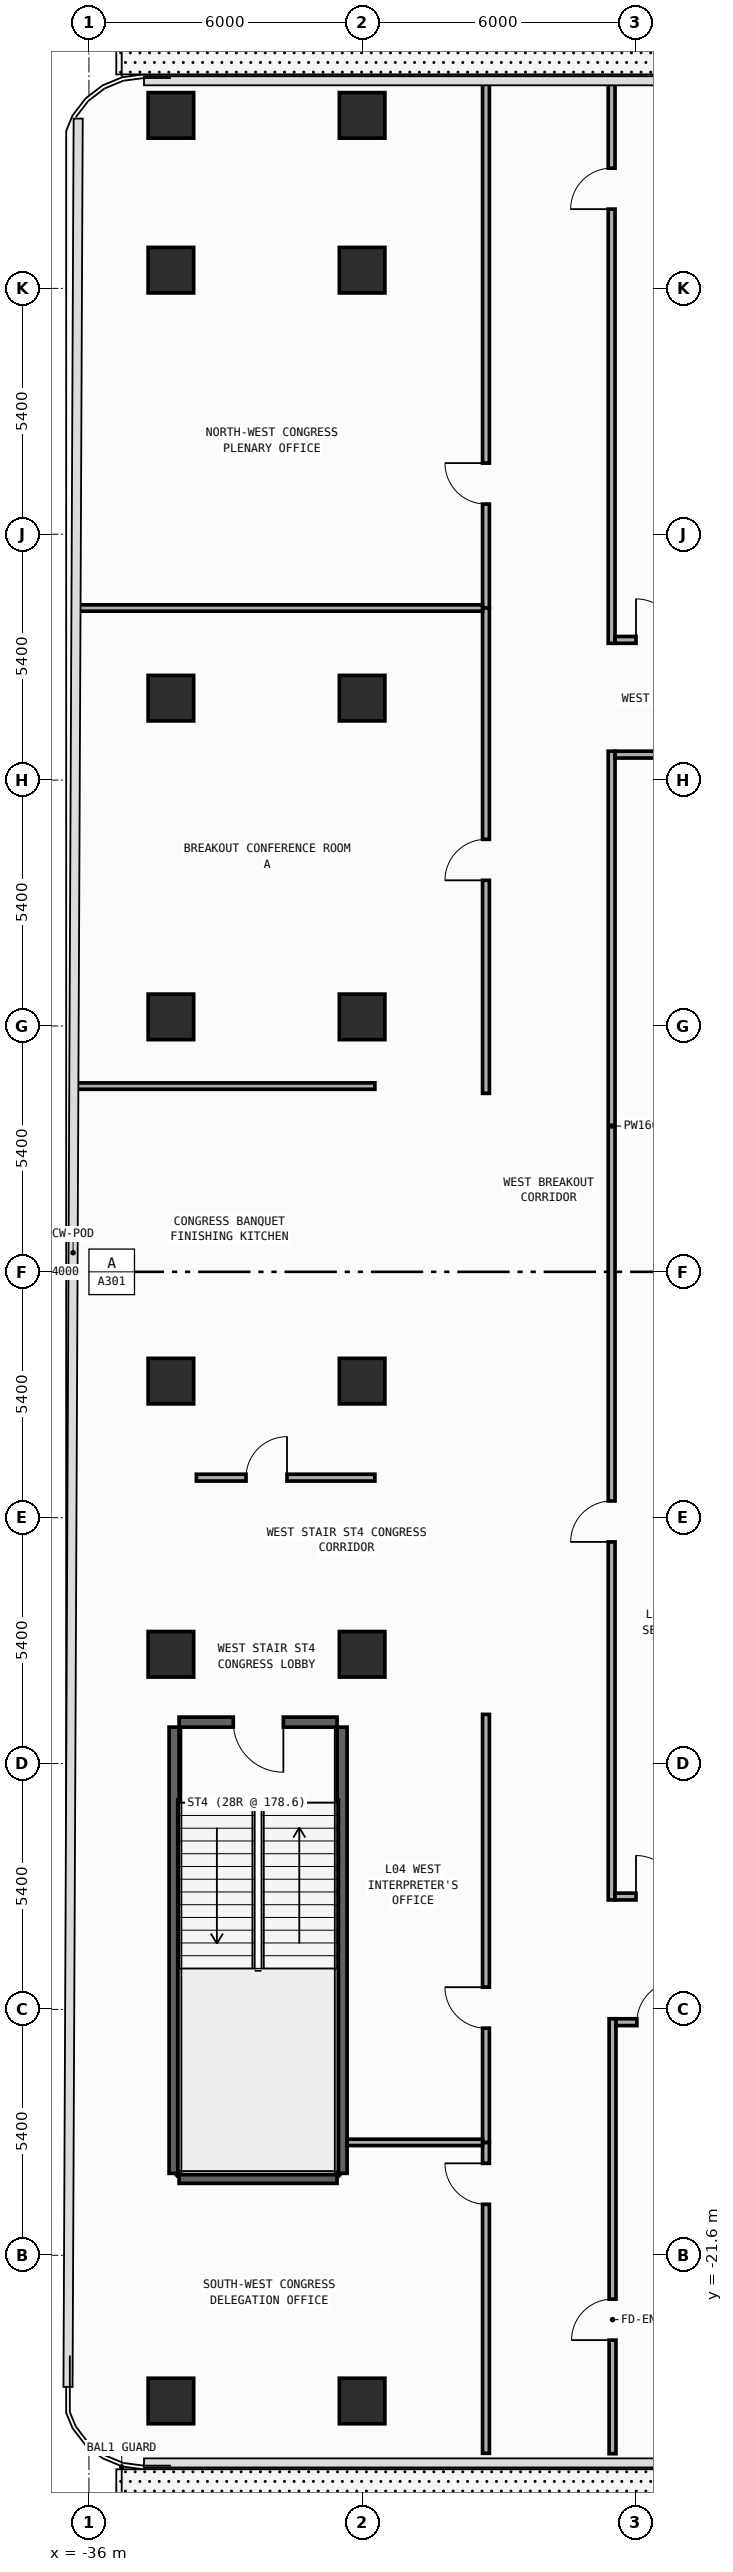
"""IFC4 building model, lengths in metres.
Left out: names, types, materials, properties, quantities, classifications, styles, units other than length and angle.
Written with IfcOpenShell. Run it as: python <this file> out.ifc"""

import sys

from ifc_helpers import new_model, si_unit, direction, frame, frame_2d, origin, origin_2d, place, context, subcontext, project, spatial, rectangle, extrude, element, fill, save


model = new_model("IFC4")
c1 = context("Model", 3, precision=1e-05, world=origin(), true_north=direction((0.0, 1.0)))
c2 = subcontext(c1, "Body", "Model", "MODEL_VIEW")
j1 = project(units=[si_unit("LENGTHUNIT", "METRE"), si_unit("PLANEANGLEUNIT", "RADIAN")], contexts=[c1])
p1 = place(None, origin())
s1 = spatial("IfcSite", under=j1, at=p1, CompositionType="ELEMENT")
p2 = place(p1, origin())
s2 = spatial("IfcBuilding", under=s1, at=p2, CompositionType="ELEMENT")
p3 = place(p2, frame((0.0, 0.0, 16.0)))
s3 = spatial("IfcBuildingStorey", under=s2, at=p3, CompositionType="ELEMENT", Elevation=16.0)
p4 = place(p3, frame((-30.55, -9.89, 0.0), z_axis=(0.0, 0.0, 1.0), x_axis=(-1.0, 0.0, 0.0)))
e1 = element("IfcWall", 1, at=p4, inside=s3, PredefinedType="SHEAR", context=c2, shape_type="SweptSolid", body=[
    extrude(rectangle(XDim=3.47, YDim=0.22, at=frame_2d((1.735, 0.0))), origin(), (0.0, 0.0, 1.0), 4.55),
])
p5 = place(p4, frame((1.18, 0.0, 0.0)))
e2 = element("IfcOpeningElement", 2, at=p5, cuts=e1, PredefinedType="OPENING", context=c2, shape_type="SweptSolid", body=[
    extrude(rectangle(XDim=1.1, YDim=2.2, at=frame_2d((0.55, 1.1))), frame((0.0, 0.12, 0.0), z_axis=(0.0, -1.0, 0.0), x_axis=(1.0, 0.0, 0.0)), (0.0, 0.0, 1.0), 0.24),
])
p6 = place(p3, frame((-34.02, -19.91, 0.0), z_axis=(0.0, 0.0, 1.0), x_axis=(1.0, 0.0, 0.0)))
e3 = element("IfcWall", 3, at=p6, inside=s3, PredefinedType="SHEAR", context=c2, shape_type="SweptSolid", body=[
    extrude(rectangle(XDim=3.47, YDim=0.22, at=frame_2d((1.735, 0.0))), origin(), (0.0, 0.0, 1.0), 4.55),
])
for number, where, z_axis, x_axis in (
    (4, (-34.13, -19.8, 0.0), (0.0, 0.0, 1.0), (0.0, 1.0, 0.0)),
    (5, (-30.44, -19.8, 0.0), (0.0, 0.0, 1.0), (0.0, 1.0, 0.0)),
):
    element("IfcWall", number, at=place(p3, frame(where, z_axis=z_axis, x_axis=x_axis)), inside=s3, PredefinedType="SHEAR", context=c2, shape_type="SweptSolid", body=[
        extrude(rectangle(XDim=9.8, YDim=0.22, at=frame_2d((4.9, 0.0))), origin(), (0.0, 0.0, 1.0), 4.55),
    ])
for number, where, z_axis, x_axis in (
    (6, (-34.2, -24.8, 0.0), (0.0, 0.0, 1.0), (1.0, 0.0, 0.0)),
    (7, (-34.2, -8.4, 0.0), (0.0, 0.0, 1.0), (1.0, 0.0, 0.0)),
    (8, (-34.2, -2.4, 0.0), (0.0, 0.0, 1.0), (1.0, 0.0, 0.0)),
    (9, (-34.2, 5.6, 0.0), (0.0, 0.0, 1.0), (1.0, 0.0, 0.0)),
    (10, (-34.2, 12.6, 0.0), (0.0, 0.0, 1.0), (1.0, 0.0, 0.0)),
    (11, (-34.2, 22.0, 0.0), (0.0, 0.0, 1.0), (1.0, 0.0, 0.0)),
    (12, (-34.2, 25.4, 0.0), (0.0, 0.0, 1.0), (1.0, 0.0, 0.0)),
    (13, (-30.0, -24.8, 0.0), (0.0, 0.0, 1.0), (1.0, 0.0, 0.0)),
    (14, (-30.0, -8.4, 0.0), (0.0, 0.0, 1.0), (1.0, 0.0, 0.0)),
    (15, (-30.0, -2.4, 0.0), (0.0, 0.0, 1.0), (1.0, 0.0, 0.0)),
    (16, (-30.0, 5.6, 0.0), (0.0, 0.0, 1.0), (1.0, 0.0, 0.0)),
    (17, (-30.0, 12.6, 0.0), (0.0, 0.0, 1.0), (1.0, 0.0, 0.0)),
    (18, (-30.0, 22.0, 0.0), (0.0, 0.0, 1.0), (1.0, 0.0, 0.0)),
    (19, (-30.0, 25.4, 0.0), (0.0, 0.0, 1.0), (1.0, 0.0, 0.0)),
):
    element("IfcColumn", number, at=place(p3, frame(where, z_axis=z_axis, x_axis=x_axis)), inside=s3, PredefinedType="COLUMN", context=c2, shape_type="SweptSolid", body=[
        extrude(rectangle(XDim=1.0, YDim=1.0, at=origin_2d()), origin(), (0.0, 0.0, 1.0), 5.0),
    ])
p7 = place(p3, frame((-24.5, -25.958, 0.0), z_axis=(0.0, 0.0, 1.0), x_axis=(0.0, 1.0, 0.0)))
e20 = element("IfcWall", 20, at=p7, inside=s3, PredefinedType="PARTITIONING", context=c2, shape_type="SweptSolid", body=[
    extrude(rectangle(XDim=9.553, YDim=0.15, at=frame_2d((4.776, 0.0))), origin(), (0.0, 0.0, 1.0), 4.55),
])
p8 = place(p7, frame((2.495, 0.0, 0.0)))
e21 = element("IfcOpeningElement", 21, at=p8, cuts=e20, PredefinedType="OPENING", context=c2, shape_type="SweptSolid", body=[
    extrude(rectangle(XDim=0.9, YDim=2.15, at=frame_2d((0.45, 1.075))), frame((0.0, 0.085, 0.0), z_axis=(0.0, -1.0, 0.0), x_axis=(1.0, 0.0, 0.0)), (0.0, 0.0, 1.0), 0.17),
])
p9 = place(p3, frame((-27.28, 14.58, 0.0), z_axis=(0.0, 0.0, 1.0), x_axis=(0.0, 1.0, 0.0)))
e22 = element("IfcWall", 22, at=p9, inside=s3, PredefinedType="PARTITIONING", context=c2, shape_type="SweptSolid", body=[
    extrude(rectangle(XDim=11.541, YDim=0.15, at=frame_2d((5.771, 0.0))), origin(), (0.0, 0.0, 1.0), 4.55),
])
p10 = place(p9, frame((2.283, 0.0, 0.0)))
e23 = element("IfcOpeningElement", 23, at=p10, cuts=e22, PredefinedType="OPENING", context=c2, shape_type="SweptSolid", body=[
    extrude(rectangle(XDim=0.9, YDim=2.15, at=frame_2d((0.45, 1.075))), frame((0.0, 0.085, 0.0), z_axis=(0.0, -1.0, 0.0), x_axis=(1.0, 0.0, 0.0)), (0.0, 0.0, 1.0), 0.17),
])
p11 = place(p3, frame((-27.28, 3.92, 0.0), z_axis=(0.0, 0.0, 1.0), x_axis=(0.0, 1.0, 0.0)))
e24 = element("IfcWall", 24, at=p11, inside=s3, PredefinedType="PARTITIONING", context=c2, shape_type="SweptSolid", body=[
    extrude(rectangle(XDim=10.66, YDim=0.15, at=frame_2d((5.33, 0.0))), origin(), (0.0, 0.0, 1.0), 4.55),
])
p12 = place(p11, frame((4.679, 0.0, 0.0)))
e25 = element("IfcOpeningElement", 25, at=p12, cuts=e24, PredefinedType="OPENING", context=c2, shape_type="SweptSolid", body=[
    extrude(rectangle(XDim=0.9, YDim=2.15, at=frame_2d((0.45, 1.075))), frame((0.0, 0.085, 0.0), z_axis=(0.0, -1.0, 0.0), x_axis=(1.0, 0.0, 0.0)), (0.0, 0.0, 1.0), 0.17),
])
p13 = place(p3, frame((-27.28, -25.949, 0.0), z_axis=(0.0, 0.0, 1.0), x_axis=(0.0, 1.0, 0.0)))
e26 = element("IfcWall", 26, at=p13, inside=s3, PredefinedType="PARTITIONING", context=c2, shape_type="SweptSolid", body=[
    extrude(rectangle(XDim=6.829, YDim=0.15, at=frame_2d((3.415, 0.0))), origin(), (0.0, 0.0, 1.0), 4.55),
])
p14 = place(p13, frame((5.469, 0.0, 0.0)))
e27 = element("IfcOpeningElement", 27, at=p14, cuts=e26, PredefinedType="OPENING", context=c2, shape_type="SweptSolid", body=[
    extrude(rectangle(XDim=0.9, YDim=2.15, at=frame_2d((0.45, 1.075))), frame((0.0, 0.085, 0.0), z_axis=(0.0, -1.0, 0.0), x_axis=(1.0, 0.0, 0.0)), (0.0, 0.0, 1.0), 0.17),
])
p15 = place(p3, frame((-24.52, -13.795, 0.0), z_axis=(0.0, 0.0, 1.0), x_axis=(0.0, 1.0, 0.0)))
e28 = element("IfcWall", 28, at=p15, inside=s3, PredefinedType="PARTITIONING", context=c2, shape_type="SweptSolid", body=[
    extrude(rectangle(XDim=25.23, YDim=0.15, at=frame_2d((12.615, 0.0))), origin(), (0.0, 0.0, 1.0), 4.55),
])
p16 = place(p15, frame((7.863, 0.0, 0.0)))
e29 = element("IfcOpeningElement", 29, at=p16, cuts=e28, PredefinedType="OPENING", context=c2, shape_type="SweptSolid", body=[
    extrude(rectangle(XDim=0.9, YDim=2.15, at=frame_2d((0.45, 1.075))), frame((0.0, 0.085, 0.0), z_axis=(0.0, -1.0, 0.0), x_axis=(1.0, 0.0, 0.0)), (0.0, 0.0, 1.0), 0.17),
])
p17 = place(p3, frame((-27.28, -19.12, 0.0), z_axis=(0.0, 0.0, 1.0), x_axis=(0.0, 1.0, 0.0)))
e30 = element("IfcWall", 30, at=p17, inside=s3, PredefinedType="PARTITIONING", context=c2, shape_type="SweptSolid", body=[
    extrude(rectangle(XDim=9.4, YDim=0.15, at=frame_2d((4.7, 0.0))), origin(), (0.0, 0.0, 1.0), 4.55),
])
p18 = place(p17, frame((2.509, 0.0, 0.0)))
e31 = element("IfcOpeningElement", 31, at=p18, cuts=e30, PredefinedType="OPENING", context=c2, shape_type="SweptSolid", body=[
    extrude(rectangle(XDim=0.9, YDim=2.15, at=frame_2d((0.45, 1.075))), frame((0.0, 0.085, 0.0), z_axis=(0.0, -1.0, 0.0), x_axis=(1.0, 0.0, 0.0)), (0.0, 0.0, 1.0), 0.17),
])
p19 = place(p3, frame((-24.52, 13.805, 0.0), z_axis=(0.0, 0.0, 1.0), x_axis=(0.0, 1.0, 0.0)))
e32 = element("IfcWall", 32, at=p19, inside=s3, PredefinedType="PARTITIONING", context=c2, shape_type="SweptSolid", body=[
    extrude(rectangle(XDim=12.308, YDim=0.15, at=frame_2d((6.154, 0.0))), origin(), (0.0, 0.0, 1.0), 4.55),
])
p20 = place(p19, frame((9.536, 0.0, 0.0)))
e33 = element("IfcOpeningElement", 33, at=p20, cuts=e32, PredefinedType="OPENING", context=c2, shape_type="SweptSolid", body=[
    extrude(rectangle(XDim=0.9, YDim=2.15, at=frame_2d((0.45, 1.075))), frame((0.0, 0.085, 0.0), z_axis=(0.0, -1.0, 0.0), x_axis=(1.0, 0.0, 0.0)), (0.0, 0.0, 1.0), 0.17),
])
p21 = place(p3, frame((-24.425, -16.48, 0.0), z_axis=(0.0, 0.0, 1.0), x_axis=(1.0, 0.0, 0.0)))
e34 = element("IfcWall", 34, at=p21, inside=s3, PredefinedType="PARTITIONING", context=c2, shape_type="SweptSolid", body=[
    extrude(rectangle(XDim=12.5, YDim=0.15, at=frame_2d((6.25, 0.0))), origin(), (0.0, 0.0, 1.0), 4.55),
])
p22 = place(p21, frame((0.46, 0.0, 0.0)))
e35 = element("IfcOpeningElement", 35, at=p22, cuts=e34, PredefinedType="OPENING", context=c2, shape_type="SweptSolid", body=[
    extrude(rectangle(XDim=0.9, YDim=2.15, at=frame_2d((0.45, 1.075))), frame((0.0, 0.085, 0.0), z_axis=(0.0, -1.0, 0.0), x_axis=(1.0, 0.0, 0.0)), (0.0, 0.0, 1.0), 0.17),
])
p23 = place(p3, frame((-24.445, -13.72, 0.0), z_axis=(0.0, 0.0, 1.0), x_axis=(1.0, 0.0, 0.0)))
e36 = element("IfcWall", 36, at=p23, inside=s3, PredefinedType="PARTITIONING", context=c2, shape_type="SweptSolid", body=[
    extrude(rectangle(XDim=4.135, YDim=0.15, at=frame_2d((2.067, 0.0))), origin(), (0.0, 0.0, 1.0), 4.55),
])
p24 = place(p23, frame((0.46, 0.0, 0.0)))
e37 = element("IfcOpeningElement", 37, at=p24, cuts=e36, PredefinedType="OPENING", context=c2, shape_type="SweptSolid", body=[
    extrude(rectangle(XDim=0.9, YDim=2.15, at=frame_2d((0.45, 1.075))), frame((0.0, 0.085, 0.0), z_axis=(0.0, -1.0, 0.0), x_axis=(1.0, 0.0, 0.0)), (0.0, 0.0, 1.0), 0.17),
])
p25 = place(p3, frame((-24.445, 11.36, 0.0), z_axis=(0.0, 0.0, 1.0), x_axis=(1.0, 0.0, 0.0)))
e38 = element("IfcWall", 38, at=p25, inside=s3, PredefinedType="PARTITIONING", context=c2, shape_type="SweptSolid", body=[
    extrude(rectangle(XDim=4.045, YDim=0.15, at=frame_2d((2.022, 0.0))), origin(), (0.0, 0.0, 1.0), 4.55),
])
p26 = place(p3, frame((-24.445, 13.88, 0.0), z_axis=(0.0, 0.0, 1.0), x_axis=(1.0, 0.0, 0.0)))
e39 = element("IfcWall", 39, at=p26, inside=s3, PredefinedType="PARTITIONING", context=c2, shape_type="SweptSolid", body=[
    extrude(rectangle(XDim=12.555, YDim=0.15, at=frame_2d((6.278, 0.0))), origin(), (0.0, 0.0, 1.0), 4.55),
])
p27 = place(p26, frame((0.46, 0.0, 0.0)))
e40 = element("IfcOpeningElement", 40, at=p27, cuts=e39, PredefinedType="OPENING", context=c2, shape_type="SweptSolid", body=[
    extrude(rectangle(XDim=0.9, YDim=2.15, at=frame_2d((0.45, 1.075))), frame((0.0, 0.085, 0.0), z_axis=(0.0, -1.0, 0.0), x_axis=(1.0, 0.0, 0.0)), (0.0, 0.0, 1.0), 0.17),
])
p28 = place(p3, frame((-33.64, -4.52, 0.0), z_axis=(0.0, 0.0, 1.0), x_axis=(1.0, 0.0, 0.0)))
e41 = element("IfcWall", 41, at=p28, inside=s3, PredefinedType="PARTITIONING", context=c2, shape_type="SweptSolid", body=[
    extrude(rectangle(XDim=3.92, YDim=0.15, at=frame_2d((1.96, 0.0))), origin(), (0.0, 0.0, 1.0), 4.55),
])
p29 = place(p28, frame((1.09, 0.0, 0.0)))
e42 = element("IfcOpeningElement", 42, at=p29, cuts=e41, PredefinedType="OPENING", context=c2, shape_type="SweptSolid", body=[
    extrude(rectangle(XDim=0.9, YDim=2.15, at=frame_2d((0.45, 1.075))), frame((0.0, 0.085, 0.0), z_axis=(0.0, -1.0, 0.0), x_axis=(1.0, 0.0, 0.0)), (0.0, 0.0, 1.0), 0.17),
])
p30 = place(p3, frame((-36.271, 14.58, 0.0), z_axis=(0.0, 0.0, 1.0), x_axis=(1.0, 0.0, 0.0)))
e43 = element("IfcWall", 43, at=p30, inside=s3, PredefinedType="PARTITIONING", context=c2, shape_type="SweptSolid", body=[
    extrude(rectangle(XDim=8.916, YDim=0.14, at=frame_2d((4.458, 0.0))), origin(), (0.0, 0.0, 1.0), 4.55),
])
p31 = place(p3, frame((-36.318, 4.08, 0.0), z_axis=(0.0, 0.0, 1.0), x_axis=(1.0, 0.0, 0.0)))
e44 = element("IfcWall", 44, at=p31, inside=s3, PredefinedType="PARTITIONING", context=c2, shape_type="SweptSolid", body=[
    extrude(rectangle(XDim=6.598, YDim=0.14, at=frame_2d((3.299, 0.0))), origin(), (0.0, 0.0, 1.0), 4.55),
])
p32 = place(p3, frame((-30.33, -19.12, 0.0), z_axis=(0.0, 0.0, 1.0), x_axis=(1.0, 0.0, 0.0)))
e45 = element("IfcWall", 45, at=p32, inside=s3, PredefinedType="PARTITIONING", context=c2, shape_type="SweptSolid", body=[
    extrude(rectangle(XDim=2.975, YDim=0.14, at=frame_2d((1.488, 0.0))), origin(), (0.0, 0.0, 1.0), 4.55),
])
p33 = place(p5, origin())
e46 = element("IfcDoor", 46, at=p33, inside=s3, OperationType="SINGLE_SWING_LEFT", PredefinedType="DOOR", context=c2, shape_type="SweptSolid", body=[
    extrude(rectangle(XDim=1.1, YDim=2.2, at=frame_2d((0.55, 1.1))), frame((0.0, 0.025, 0.0), z_axis=(0.0, -1.0, 0.0), x_axis=(1.0, 0.0, 0.0)), (0.0, 0.0, 1.0), 0.05),
])
fill(e2, e46)
p34 = place(p8, origin())
e47 = element("IfcDoor", 47, at=p34, inside=s3, OperationType="SINGLE_SWING_LEFT", PredefinedType="DOOR", context=c2, shape_type="SweptSolid", body=[
    extrude(rectangle(XDim=0.9, YDim=2.15, at=frame_2d((0.45, 1.075))), frame((0.0, 0.025, 0.0), z_axis=(0.0, -1.0, 0.0), x_axis=(1.0, 0.0, 0.0)), (0.0, 0.0, 1.0), 0.05),
])
fill(e21, e47)
p35 = place(p10, origin())
e48 = element("IfcDoor", 48, at=p35, inside=s3, OperationType="SINGLE_SWING_RIGHT", PredefinedType="DOOR", context=c2, shape_type="SweptSolid", body=[
    extrude(rectangle(XDim=0.9, YDim=2.15, at=frame_2d((0.45, 1.075))), frame((0.0, 0.025, 0.0), z_axis=(0.0, -1.0, 0.0), x_axis=(1.0, 0.0, 0.0)), (0.0, 0.0, 1.0), 0.05),
])
fill(e23, e48)
p36 = place(p12, origin())
e49 = element("IfcDoor", 49, at=p36, inside=s3, OperationType="SINGLE_SWING_LEFT", PredefinedType="DOOR", context=c2, shape_type="SweptSolid", body=[
    extrude(rectangle(XDim=0.9, YDim=2.15, at=frame_2d((0.45, 1.075))), frame((0.0, 0.025, 0.0), z_axis=(0.0, -1.0, 0.0), x_axis=(1.0, 0.0, 0.0)), (0.0, 0.0, 1.0), 0.05),
])
fill(e25, e49)
p37 = place(p14, origin())
e50 = element("IfcDoor", 50, at=p37, inside=s3, OperationType="SINGLE_SWING_RIGHT", PredefinedType="DOOR", context=c2, shape_type="SweptSolid", body=[
    extrude(rectangle(XDim=0.9, YDim=2.15, at=frame_2d((0.45, 1.075))), frame((0.0, 0.025, 0.0), z_axis=(0.0, -1.0, 0.0), x_axis=(1.0, 0.0, 0.0)), (0.0, 0.0, 1.0), 0.05),
])
fill(e27, e50)
p38 = place(p16, origin())
e51 = element("IfcDoor", 51, at=p38, inside=s3, OperationType="SINGLE_SWING_LEFT", PredefinedType="DOOR", context=c2, shape_type="SweptSolid", body=[
    extrude(rectangle(XDim=0.9, YDim=2.15, at=frame_2d((0.45, 1.075))), frame((0.0, 0.025, 0.0), z_axis=(0.0, -1.0, 0.0), x_axis=(1.0, 0.0, 0.0)), (0.0, 0.0, 1.0), 0.05),
])
fill(e29, e51)
p39 = place(p18, origin())
e52 = element("IfcDoor", 52, at=p39, inside=s3, OperationType="SINGLE_SWING_RIGHT", PredefinedType="DOOR", context=c2, shape_type="SweptSolid", body=[
    extrude(rectangle(XDim=0.9, YDim=2.15, at=frame_2d((0.45, 1.075))), frame((0.0, 0.025, 0.0), z_axis=(0.0, -1.0, 0.0), x_axis=(1.0, 0.0, 0.0)), (0.0, 0.0, 1.0), 0.05),
])
fill(e31, e52)
p40 = place(p20, origin())
e53 = element("IfcDoor", 53, at=p40, inside=s3, OperationType="SINGLE_SWING_LEFT", PredefinedType="DOOR", context=c2, shape_type="SweptSolid", body=[
    extrude(rectangle(XDim=0.9, YDim=2.15, at=frame_2d((0.45, 1.075))), frame((0.0, 0.025, 0.0), z_axis=(0.0, -1.0, 0.0), x_axis=(1.0, 0.0, 0.0)), (0.0, 0.0, 1.0), 0.05),
])
fill(e33, e53)
p41 = place(p22, origin())
e54 = element("IfcDoor", 54, at=p41, inside=s3, OperationType="SINGLE_SWING_RIGHT", PredefinedType="DOOR", context=c2, shape_type="SweptSolid", body=[
    extrude(rectangle(XDim=0.9, YDim=2.15, at=frame_2d((0.45, 1.075))), frame((0.0, 0.025, 0.0), z_axis=(0.0, -1.0, 0.0), x_axis=(1.0, 0.0, 0.0)), (0.0, 0.0, 1.0), 0.05),
])
fill(e35, e54)
p42 = place(p24, origin())
e55 = element("IfcDoor", 55, at=p42, inside=s3, OperationType="SINGLE_SWING_LEFT", PredefinedType="DOOR", context=c2, shape_type="SweptSolid", body=[
    extrude(rectangle(XDim=0.9, YDim=2.15, at=frame_2d((0.45, 1.075))), frame((0.0, 0.025, 0.0), z_axis=(0.0, -1.0, 0.0), x_axis=(1.0, 0.0, 0.0)), (0.0, 0.0, 1.0), 0.05),
])
fill(e37, e55)
p43 = place(p27, origin())
e56 = element("IfcDoor", 56, at=p43, inside=s3, OperationType="SINGLE_SWING_LEFT", PredefinedType="DOOR", context=c2, shape_type="SweptSolid", body=[
    extrude(rectangle(XDim=0.9, YDim=2.15, at=frame_2d((0.45, 1.075))), frame((0.0, 0.025, 0.0), z_axis=(0.0, -1.0, 0.0), x_axis=(1.0, 0.0, 0.0)), (0.0, 0.0, 1.0), 0.05),
])
fill(e40, e56)
p44 = place(p29, origin())
e57 = element("IfcDoor", 57, at=p44, inside=s3, OperationType="SINGLE_SWING_RIGHT", PredefinedType="DOOR", context=c2, shape_type="SweptSolid", body=[
    extrude(rectangle(XDim=0.9, YDim=2.15, at=frame_2d((0.45, 1.075))), frame((0.0, 0.025, 0.0), z_axis=(0.0, -1.0, 0.0), x_axis=(1.0, 0.0, 0.0)), (0.0, 0.0, 1.0), 0.05),
])
fill(e42, e57)
save(model, sys.argv[1])
